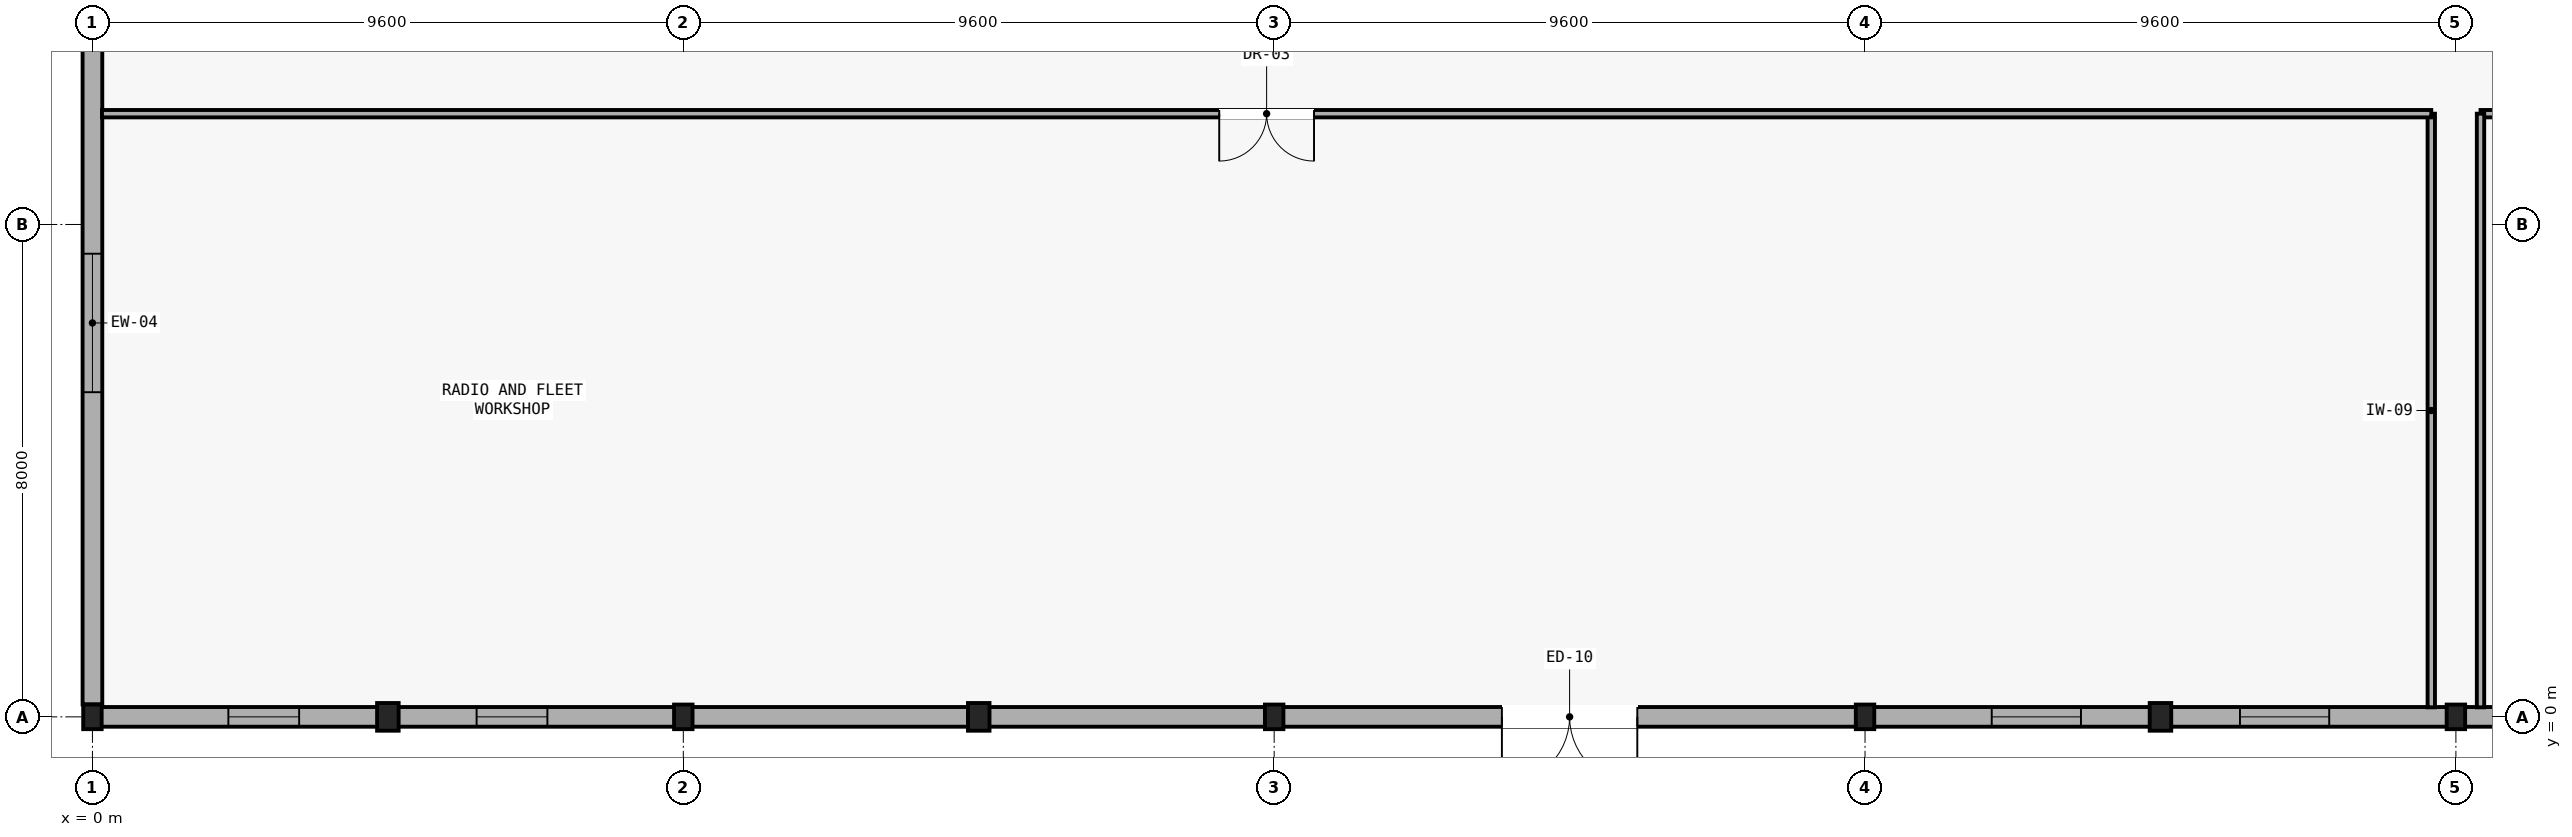
"""IFC4 building model, lengths in metres.
Left out: names, types, materials, properties, quantities, classifications, styles, units other than length and angle.
Written with IfcOpenShell. Run it as: python <this file> out.ifc"""

import sys

from ifc_helpers import new_model, si_unit, direction, frame, frame_2d, origin, origin_2d, place, context, subcontext, project, spatial, rectangle, i_section, extrude, element, fill, save


model = new_model("IFC4")
c1 = context("Model", 3, precision=1e-05, world=origin(), true_north=direction((0.0, 1.0)))
c2 = subcontext(c1, "Body", "Model", "MODEL_VIEW")
j1 = project(units=[si_unit("LENGTHUNIT", "METRE"), si_unit("PLANEANGLEUNIT", "RADIAN")], contexts=[c1])
p1 = place(None, origin())
s1 = spatial("IfcSite", under=j1, at=p1, CompositionType="ELEMENT")
p2 = place(p1, origin())
s2 = spatial("IfcBuilding", under=s1, at=p2, CompositionType="ELEMENT")
p3 = place(p2, origin())
s3 = spatial("IfcBuildingStorey", under=s2, at=p3, CompositionType="ELEMENT", Elevation=0.0)
for number, where, z_axis, x_axis in (
    (1, (0.0, 0.0, -0.27), (0.0, 0.0, 1.0), (1.0, 0.0, 0.0)),
    (2, (9.6, 0.0, -0.27), (0.0, 0.0, 1.0), (1.0, 0.0, 0.0)),
    (3, (19.2, 0.0, -0.27), (0.0, 0.0, 1.0), (1.0, 0.0, 0.0)),
    (4, (28.8, 0.0, -0.27), (0.0, 0.0, 1.0), (1.0, 0.0, 0.0)),
    (5, (38.4, 0.0, -0.27), (0.0, 0.0, 1.0), (1.0, 0.0, 0.0)),
):
    element("IfcColumn", number, at=place(p3, frame(where, z_axis=z_axis, x_axis=x_axis)), inside=s3, PredefinedType="COLUMN", context=c2, shape_type="SweptSolid", body=[
        extrude(i_section(OverallWidth=0.3, OverallDepth=0.4, WebThickness=0.013, FlangeThickness=0.024, FilletRadius=0.027, at=origin_2d()), origin(), (0.0, 0.0, 1.0), 5.52),
    ])
for number, where, z_axis, x_axis in (
    (6, (4.8, 0.0, -0.27), (0.0, 0.0, 1.0), (1.0, 0.0, 0.0)),
    (7, (14.4, 0.0, -0.27), (0.0, 0.0, 1.0), (1.0, 0.0, 0.0)),
    (8, (33.6, 0.0, -0.27), (0.0, 0.0, 1.0), (1.0, 0.0, 0.0)),
):
    element("IfcColumn", number, at=place(p3, frame(where, z_axis=z_axis, x_axis=x_axis)), inside=s3, PredefinedType="PILASTER", context=c2, shape_type="SweptSolid", body=[
        extrude(rectangle(XDim=0.35, YDim=0.45, at=origin_2d()), origin(), (0.0, 0.0, 1.0), 5.27),
    ])
p4 = place(p3, frame((0.009, 0.0, 0.0), z_axis=(0.0, 0.0, 1.0), x_axis=(1.0, 0.0, 0.0)))
e9 = element("IfcWall", 9, at=p4, inside=s3, PredefinedType="SOLIDWALL", context=c2, shape_type="SweptSolid", body=[
    extrude(rectangle(XDim=9.583, YDim=0.32, at=frame_2d((4.791, 0.0))), origin(), (0.0, 0.0, 1.0), 4.67),
])
p5 = place(p4, frame((2.2, 0.0, 0.9)))
e10 = element("IfcOpeningElement", 10, at=p5, cuts=e9, PredefinedType="OPENING", context=c2, shape_type="SweptSolid", body=[
    extrude(rectangle(XDim=1.15, YDim=1.3, at=frame_2d((0.575, 0.65))), frame((0.0, 0.17, 0.0), z_axis=(0.0, -1.0, 0.0), x_axis=(1.0, 0.0, 0.0)), (0.0, 0.0, 1.0), 0.34),
])
p6 = place(p4, frame((6.233, 0.0, 0.9)))
e11 = element("IfcOpeningElement", 11, at=p6, cuts=e9, PredefinedType="OPENING", context=c2, shape_type="SweptSolid", body=[
    extrude(rectangle(XDim=1.15, YDim=1.3, at=frame_2d((0.575, 0.65))), frame((0.0, 0.17, 0.0), z_axis=(0.0, -1.0, 0.0), x_axis=(1.0, 0.0, 0.0)), (0.0, 0.0, 1.0), 0.34),
])
p7 = place(p3, frame((9.609, 0.0, 0.0), z_axis=(0.0, 0.0, 1.0), x_axis=(1.0, 0.0, 0.0)))
e12 = element("IfcWall", 12, at=p7, inside=s3, PredefinedType="SOLIDWALL", context=c2, shape_type="SweptSolid", body=[
    extrude(rectangle(XDim=9.583, YDim=0.32, at=frame_2d((4.791, 0.0))), origin(), (0.0, 0.0, 1.0), 4.67),
])
p8 = place(p3, frame((19.209, 0.0, 0.0), z_axis=(0.0, 0.0, 1.0), x_axis=(1.0, 0.0, 0.0)))
e13 = element("IfcWall", 13, at=p8, inside=s3, PredefinedType="SOLIDWALL", context=c2, shape_type="SweptSolid", body=[
    extrude(rectangle(XDim=9.583, YDim=0.32, at=frame_2d((4.791, 0.0))), origin(), (0.0, 0.0, 1.0), 4.67),
])
p9 = place(p8, frame((3.691, 0.0, 0.0)))
e14 = element("IfcOpeningElement", 14, at=p9, cuts=e13, PredefinedType="OPENING", context=c2, shape_type="SweptSolid", body=[
    extrude(rectangle(XDim=2.2, YDim=2.35, at=frame_2d((1.1, 1.175))), frame((0.0, 0.17, 0.0), z_axis=(0.0, -1.0, 0.0), x_axis=(1.0, 0.0, 0.0)), (0.0, 0.0, 1.0), 0.34),
])
p10 = place(p3, frame((28.809, 0.0, 0.0), z_axis=(0.0, 0.0, 1.0), x_axis=(1.0, 0.0, 0.0)))
e15 = element("IfcWall", 15, at=p10, inside=s3, PredefinedType="SOLIDWALL", context=c2, shape_type="SweptSolid", body=[
    extrude(rectangle(XDim=9.583, YDim=0.32, at=frame_2d((4.791, 0.0))), origin(), (0.0, 0.0, 1.0), 4.67),
])
p11 = place(p10, frame((2.05, 0.0, 0.9)))
e16 = element("IfcOpeningElement", 16, at=p11, cuts=e15, PredefinedType="OPENING", context=c2, shape_type="SweptSolid", body=[
    extrude(rectangle(XDim=1.45, YDim=1.3, at=frame_2d((0.725, 0.65))), frame((0.0, 0.17, 0.0), z_axis=(0.0, -1.0, 0.0), x_axis=(1.0, 0.0, 0.0)), (0.0, 0.0, 1.0), 0.34),
])
p12 = place(p10, frame((6.083, 0.0, 0.9)))
e17 = element("IfcOpeningElement", 17, at=p12, cuts=e15, PredefinedType="OPENING", context=c2, shape_type="SweptSolid", body=[
    extrude(rectangle(XDim=1.45, YDim=1.3, at=frame_2d((0.725, 0.65))), frame((0.0, 0.17, 0.0), z_axis=(0.0, -1.0, 0.0), x_axis=(1.0, 0.0, 0.0)), (0.0, 0.0, 1.0), 0.34),
])
p13 = place(p3, frame((38.409, 0.0, 0.0), z_axis=(0.0, 0.0, 1.0), x_axis=(1.0, 0.0, 0.0)))
e18 = element("IfcWall", 18, at=p13, inside=s3, PredefinedType="SOLIDWALL", context=c2, shape_type="SweptSolid", body=[
    extrude(rectangle(XDim=9.583, YDim=0.32, at=frame_2d((4.791, 0.0))), origin(), (0.0, 0.0, 1.0), 4.67),
])
p14 = place(p3, frame((0.0, 0.202, 0.0), z_axis=(0.0, 0.0, 1.0), x_axis=(0.0, 1.0, 0.0)))
e19 = element("IfcWall", 19, at=p14, inside=s3, PredefinedType="SOLIDWALL", context=c2, shape_type="SweptSolid", body=[
    extrude(rectangle(XDim=12.396, YDim=0.32, at=frame_2d((6.198, 0.0))), origin(), (0.0, 0.0, 1.0), 4.59),
])
p15 = place(p14, frame((5.073, 0.0, 0.9)))
e20 = element("IfcOpeningElement", 20, at=p15, cuts=e19, PredefinedType="OPENING", context=c2, shape_type="SweptSolid", body=[
    extrude(rectangle(XDim=2.25, YDim=1.55, at=frame_2d((1.125, 0.775))), frame((0.0, 0.17, 0.0), z_axis=(0.0, -1.0, 0.0), x_axis=(1.0, 0.0, 0.0)), (0.0, 0.0, 1.0), 0.34),
])
p16 = place(p3, frame((38.0, 0.155, 0.0), z_axis=(0.0, 0.0, 1.0), x_axis=(0.0, 1.0, 0.0)))
e21 = element("IfcWall", 21, at=p16, inside=s3, PredefinedType="PARTITIONING", context=c2, shape_type="SweptSolid", body=[
    extrude(rectangle(XDim=9.645, YDim=0.12, at=frame_2d((4.823, 0.0))), origin(), (0.0, 0.0, 1.0), 5.0),
])
p17 = place(p3, frame((38.0, 9.8, 0.0), z_axis=(0.0, 0.0, 1.0), x_axis=(-1.0, 0.0, 0.0)))
e22 = element("IfcWall", 22, at=p17, inside=s3, PredefinedType="PARTITIONING", context=c2, shape_type="SweptSolid", body=[
    extrude(rectangle(XDim=37.845, YDim=0.12, at=frame_2d((18.922, 0.0))), origin(), (0.0, 0.0, 1.0), 5.0),
])
p18 = place(p17, frame((18.153, 0.0, 0.0)))
e23 = element("IfcOpeningElement", 23, at=p18, cuts=e22, PredefinedType="OPENING", context=c2, shape_type="SweptSolid", body=[
    extrude(rectangle(XDim=1.54, YDim=2.2, at=frame_2d((0.77, 1.1))), frame((0.0, 0.07, 0.0), z_axis=(0.0, -1.0, 0.0), x_axis=(1.0, 0.0, 0.0)), (0.0, 0.0, 1.0), 0.14),
])
p19 = place(p3, frame((55.4, 9.8, 0.0), z_axis=(0.0, 0.0, 1.0), x_axis=(-1.0, 0.0, 0.0)))
e24 = element("IfcWall", 24, at=p19, inside=s3, PredefinedType="PARTITIONING", context=c2, shape_type="SweptSolid", body=[
    extrude(rectangle(XDim=16.6, YDim=0.12, at=frame_2d((8.3, 0.0))), origin(), (0.0, 0.0, 1.0), 5.0),
])
p20 = place(p19, frame((7.53, 0.0, 0.0)))
e25 = element("IfcOpeningElement", 25, at=p20, cuts=e24, PredefinedType="OPENING", context=c2, shape_type="SweptSolid", body=[
    extrude(rectangle(XDim=1.54, YDim=2.2, at=frame_2d((0.77, 1.1))), frame((0.0, 0.07, 0.0), z_axis=(0.0, -1.0, 0.0), x_axis=(1.0, 0.0, 0.0)), (0.0, 0.0, 1.0), 0.14),
])
p21 = place(p3, frame((38.8, 9.8, 0.0), z_axis=(0.0, 0.0, 1.0), x_axis=(0.0, -1.0, 0.0)))
e26 = element("IfcWall", 26, at=p21, inside=s3, PredefinedType="PARTITIONING", context=c2, shape_type="SweptSolid", body=[
    extrude(rectangle(XDim=9.645, YDim=0.12, at=frame_2d((4.823, 0.0))), origin(), (0.0, 0.0, 1.0), 5.0),
])
p22 = place(p5, origin())
e27 = element("IfcWindow", 27, at=p22, inside=s3, PartitioningType="SINGLE_PANEL", PredefinedType="WINDOW", context=c2, shape_type="SweptSolid", body=[
    extrude(rectangle(XDim=1.15, YDim=1.3, at=frame_2d((0.575, 0.65))), frame((0.0, 0.03, 0.0), z_axis=(0.0, -1.0, 0.0), x_axis=(1.0, 0.0, 0.0)), (0.0, 0.0, 1.0), 0.06),
])
fill(e10, e27)
p23 = place(p6, origin())
e28 = element("IfcWindow", 28, at=p23, inside=s3, PartitioningType="SINGLE_PANEL", PredefinedType="WINDOW", context=c2, shape_type="SweptSolid", body=[
    extrude(rectangle(XDim=1.15, YDim=1.3, at=frame_2d((0.575, 0.65))), frame((0.0, 0.03, 0.0), z_axis=(0.0, -1.0, 0.0), x_axis=(1.0, 0.0, 0.0)), (0.0, 0.0, 1.0), 0.06),
])
fill(e11, e28)
p24 = place(p9, frame((2.2, 0.0, 0.0), z_axis=(0.0, 0.0, 1.0), x_axis=(-1.0, 0.0, 0.0)))
e29 = element("IfcDoor", 29, at=p24, inside=s3, OperationType="SINGLE_SWING_LEFT", PredefinedType="DOOR", context=c2, shape_type="SweptSolid", body=[
    extrude(rectangle(XDim=2.2, YDim=2.35, at=frame_2d((1.1, 1.175))), frame((0.0, 0.025, 0.0), z_axis=(0.0, -1.0, 0.0), x_axis=(1.0, 0.0, 0.0)), (0.0, 0.0, 1.0), 0.05),
])
fill(e14, e29)
p25 = place(p11, origin())
e30 = element("IfcWindow", 30, at=p25, inside=s3, PartitioningType="SINGLE_PANEL", PredefinedType="WINDOW", context=c2, shape_type="SweptSolid", body=[
    extrude(rectangle(XDim=1.45, YDim=1.3, at=frame_2d((0.725, 0.65))), frame((0.0, 0.03, 0.0), z_axis=(0.0, -1.0, 0.0), x_axis=(1.0, 0.0, 0.0)), (0.0, 0.0, 1.0), 0.06),
])
fill(e16, e30)
p26 = place(p12, origin())
e31 = element("IfcWindow", 31, at=p26, inside=s3, PartitioningType="SINGLE_PANEL", PredefinedType="WINDOW", context=c2, shape_type="SweptSolid", body=[
    extrude(rectangle(XDim=1.45, YDim=1.3, at=frame_2d((0.725, 0.65))), frame((0.0, 0.03, 0.0), z_axis=(0.0, -1.0, 0.0), x_axis=(1.0, 0.0, 0.0)), (0.0, 0.0, 1.0), 0.06),
])
fill(e17, e31)
p27 = place(p15, origin())
e32 = element("IfcWindow", 32, at=p27, inside=s3, PartitioningType="SINGLE_PANEL", PredefinedType="WINDOW", context=c2, shape_type="SweptSolid", body=[
    extrude(rectangle(XDim=2.25, YDim=1.55, at=frame_2d((1.125, 0.775))), frame((0.0, 0.03, 0.0), z_axis=(0.0, -1.0, 0.0), x_axis=(1.0, 0.0, 0.0)), (0.0, 0.0, 1.0), 0.06),
])
fill(e20, e32)
p28 = place(p18, origin())
e33 = element("IfcDoor", 33, at=p28, inside=s3, OperationType="DOUBLE_DOOR_SINGLE_SWING", PredefinedType="DOOR", context=c2, shape_type="SweptSolid", body=[
    extrude(rectangle(XDim=1.54, YDim=2.2, at=frame_2d((0.77, 1.1))), frame((0.0, 0.025, 0.0), z_axis=(0.0, -1.0, 0.0), x_axis=(1.0, 0.0, 0.0)), (0.0, 0.0, 1.0), 0.05),
])
fill(e23, e33)
save(model, sys.argv[1])
